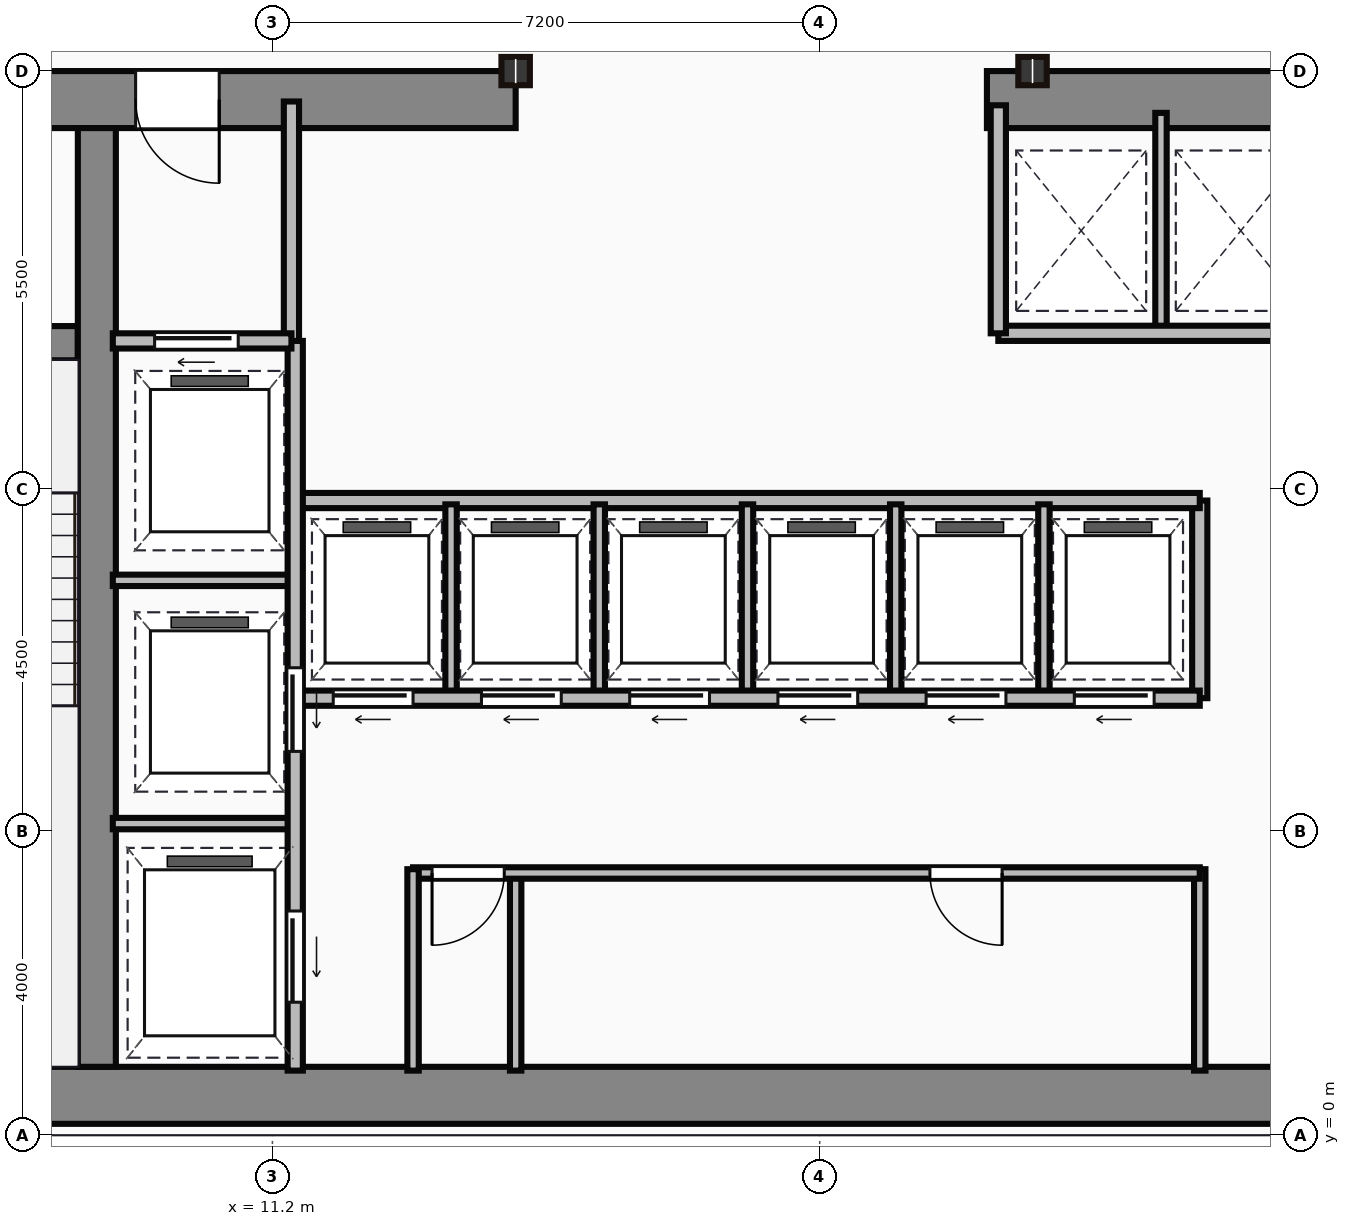
"""IFC4 building model, lengths in metres.
Left out: names, types, materials, properties, quantities, classifications, styles, units other than length and angle.
Written with IfcOpenShell. Run it as: python <this file> out.ifc"""

import sys

from ifc_helpers import new_model, si_unit, direction, frame, frame_2d, origin, origin_2d, place, context, subcontext, project, spatial, rectangle, i_section, extrude, source, transform, mapped, element, fill, save


model = new_model("IFC4")
c1 = context("Model", 3, precision=1e-05, world=origin(), true_north=direction((0.0, 1.0)))
c2 = subcontext(c1, "Body", "Model", "MODEL_VIEW")
j1 = project(units=[si_unit("LENGTHUNIT", "METRE"), si_unit("PLANEANGLEUNIT", "RADIAN")], contexts=[c1])
p1 = place(None, origin())
s1 = spatial("IfcSite", under=j1, at=p1, CompositionType="ELEMENT")
p2 = place(p1, origin())
s2 = spatial("IfcBuilding", under=s1, at=p2, CompositionType="ELEMENT")
p3 = place(p2, frame((0.0, 0.0, 180.75)))
s3 = spatial("IfcBuildingStorey", under=s2, at=p3, CompositionType="ELEMENT", Elevation=180.75)
m1 = source(origin(), c2, "Body", "SweptSolid", [
    extrude(rectangle(XDim=29.5, YDim=0.75, at=frame_2d((14.75, 0.0))), origin(), (0.0, 0.0, 1.0), 3.65),
])
p4 = place(p3, frame((4.5, 0.525, 0.0), z_axis=(0.0, 0.0, 1.0), x_axis=(1.0, 0.0, 0.0)))
e1 = element("IfcWall", 1, at=p4, inside=s3, PredefinedType="SHEAR", context=c2, shape_type="MappedRepresentation", body=[
    mapped(m1, transform((0.0, 0.0, 0.0))),
])
m2 = source(origin(), c2, "Body", "SweptSolid", [
    extrude(rectangle(XDim=9.1, YDim=0.75, at=frame_2d((4.55, 0.0))), origin(), (0.0, 0.0, 1.0), 3.65),
])
p5 = place(p3, frame((5.3, 13.625, 0.0), z_axis=(0.0, 0.0, 1.0), x_axis=(1.0, 0.0, 0.0)))
e2 = element("IfcWall", 2, at=p5, inside=s3, PredefinedType="SHEAR", context=c2, shape_type="MappedRepresentation", body=[
    mapped(m2, transform((0.0, 0.0, 0.0))),
])
p6 = place(p5, frame((4.1, 0.0, 0.0)))
e3 = element("IfcOpeningElement", 3, at=p6, cuts=e2, PredefinedType="OPENING", context=c2, shape_type="SweptSolid", body=[
    extrude(rectangle(XDim=1.1, YDim=2.15, at=frame_2d((0.55, 1.075))), frame((0.0, 0.385, 0.0), z_axis=(0.0, -1.0, 0.0), x_axis=(1.0, 0.0, 0.0)), (0.0, 0.0, 1.0), 0.77),
])
m3 = source(origin(), c2, "Body", "SweptSolid", [
    extrude(rectangle(XDim=12.6, YDim=0.75, at=frame_2d((6.3, 0.0))), origin(), (0.0, 0.0, 1.0), 3.65),
])
p7 = place(p3, frame((20.6, 13.625, 0.0), z_axis=(0.0, 0.0, 1.0), x_axis=(1.0, 0.0, 0.0)))
e4 = element("IfcWall", 4, at=p7, inside=s3, PredefinedType="SHEAR", context=c2, shape_type="MappedRepresentation", body=[
    mapped(m3, transform((0.0, 0.0, 0.0))),
])
p8 = place(p7, frame((9.25, 0.0, 0.0)))
e5 = element("IfcOpeningElement", 5, at=p8, cuts=e4, PredefinedType="OPENING", context=c2, shape_type="SweptSolid", body=[
    extrude(rectangle(XDim=1.1, YDim=2.15, at=frame_2d((0.55, 1.075))), frame((0.0, 0.385, 0.0), z_axis=(0.0, -1.0, 0.0), x_axis=(1.0, 0.0, 0.0)), (0.0, 0.0, 1.0), 0.77),
])
m4 = source(origin(), c2, "Body", "SweptSolid", [
    extrude(rectangle(XDim=12.35, YDim=0.5, at=frame_2d((6.175, 0.0))), origin(), (0.0, 0.0, 1.0), 3.65),
])
p9 = place(p3, frame((8.89, 0.9, 0.0), z_axis=(0.0, 0.0, 1.0), x_axis=(0.0, 1.0, 0.0)))
e6 = element("IfcWall", 6, at=p9, inside=s3, PredefinedType="SHEAR", context=c2, shape_type="MappedRepresentation", body=[
    mapped(m4, transform((0.0, 0.0, 0.0))),
])
m5 = source(origin(), c2, "Body", "SweptSolid", [
    extrude(rectangle(XDim=3.39, YDim=0.45, at=frame_2d((1.695, 0.0))), origin(), (0.0, 0.0, 1.0), 3.65),
])
p10 = place(p3, frame((5.25, 10.42, 0.0), z_axis=(0.0, 0.0, 1.0), x_axis=(1.0, 0.0, 0.0)))
e7 = element("IfcWall", 7, at=p10, inside=s3, PredefinedType="SHEAR", context=c2, shape_type="MappedRepresentation", body=[
    mapped(m5, transform((0.0, 0.0, 0.0))),
])
p11 = place(p10, frame((1.05, 0.0, 0.0)))
e8 = element("IfcOpeningElement", 8, at=p11, cuts=e7, PredefinedType="OPENING", context=c2, shape_type="SweptSolid", body=[
    extrude(rectangle(XDim=1.1, YDim=2.15, at=frame_2d((0.55, 1.075))), frame((0.0, 0.235, 0.0), z_axis=(0.0, -1.0, 0.0), x_axis=(1.0, 0.0, 0.0)), (0.0, 0.0, 1.0), 0.47),
])
m6 = source(origin(), c2, "Body", "SweptSolid", [
    extrude(i_section(OverallWidth=0.374, OverallDepth=0.372, WebThickness=0.016, FlangeThickness=0.026, at=origin_2d()), origin(), (0.0, 0.0, 1.0), 3.65),
])
for number, where, z_axis, x_axis in (
    (9, (14.4, 14.0, 0.0), (0.0, 0.0, 1.0), (1.0, 0.0, 0.0)),
    (10, (21.2, 14.0, 0.0), (0.0, 0.0, 1.0), (1.0, 0.0, 0.0)),
):
    element("IfcColumn", number, at=place(p3, frame(where, z_axis=z_axis, x_axis=x_axis)), inside=s3, PredefinedType="COLUMN", context=c2, shape_type="MappedRepresentation", body=[
        mapped(m6, transform((0.0, 0.0, 0.0))),
    ])
m7 = source(origin(), c2, "Body", "SweptSolid", [
    extrude(rectangle(XDim=3.18, YDim=0.2, at=frame_2d((1.59, 0.0))), origin(), (0.0, 0.0, 1.0), 3.4),
])
p12 = place(p3, frame((11.45, 10.42, 0.0), z_axis=(0.0, 0.0, 1.0), x_axis=(0.0, 1.0, 0.0)))
e11 = element("IfcWall", 11, at=p12, inside=s3, PredefinedType="PARTITIONING", context=c2, shape_type="MappedRepresentation", body=[
    mapped(m7, transform((0.0, 0.0, 0.0))),
])
m8 = source(origin(), c2, "Body", "SweptSolid", [
    extrude(rectangle(XDim=2.35, YDim=0.2, at=frame_2d((1.175, 0.0))), origin(), (0.0, 0.0, 1.0), 3.4),
])
p13 = place(p3, frame((9.1, 10.45, 0.0), z_axis=(0.0, 0.0, 1.0), x_axis=(1.0, 0.0, 0.0)))
e12 = element("IfcWall", 12, at=p13, inside=s3, PredefinedType="PARTITIONING", context=c2, shape_type="MappedRepresentation", body=[
    mapped(m8, transform((0.0, 0.0, 0.0))),
])
p14 = place(p13, frame((0.55, 0.0, 0.0)))
e13 = element("IfcOpeningElement", 13, at=p14, cuts=e12, PredefinedType="OPENING", context=c2, shape_type="SweptSolid", body=[
    extrude(rectangle(XDim=1.1, YDim=2.15, at=frame_2d((0.55, 1.075))), frame((0.0, 0.11, 0.0), z_axis=(0.0, -1.0, 0.0), x_axis=(1.0, 0.0, 0.0)), (0.0, 0.0, 1.0), 0.22),
])
m9 = source(origin(), c2, "Body", "SweptSolid", [
    extrude(rectangle(XDim=9.6, YDim=0.2, at=frame_2d((4.8, 0.0))), origin(), (0.0, 0.0, 1.0), 3.4),
])
p15 = place(p3, frame((11.5, 0.85, 0.0), z_axis=(0.0, 0.0, 1.0), x_axis=(0.0, 1.0, 0.0)))
e14 = element("IfcWall", 14, at=p15, inside=s3, PredefinedType="PARTITIONING", context=c2, shape_type="MappedRepresentation", body=[
    mapped(m9, transform((0.0, 0.0, 0.0))),
])
p16 = place(p15, frame((4.2, 0.0, 0.0)))
e15 = element("IfcOpeningElement", 15, at=p16, cuts=e14, PredefinedType="OPENING", context=c2, shape_type="SweptSolid", body=[
    extrude(rectangle(XDim=1.1, YDim=2.15, at=frame_2d((0.55, 1.075))), frame((0.0, 0.11, 0.0), z_axis=(0.0, -1.0, 0.0), x_axis=(1.0, 0.0, 0.0)), (0.0, 0.0, 1.0), 0.22),
])
p17 = place(p15, frame((0.9, 0.0, 0.0)))
e16 = element("IfcOpeningElement", 16, at=p17, cuts=e14, PredefinedType="OPENING", context=c2, shape_type="SweptSolid", body=[
    extrude(rectangle(XDim=1.2, YDim=2.15, at=frame_2d((0.6, 1.075))), frame((0.0, 0.11, 0.0), z_axis=(0.0, -1.0, 0.0), x_axis=(1.0, 0.0, 0.0)), (0.0, 0.0, 1.0), 0.22),
])
m10 = source(origin(), c2, "Body", "SweptSolid", [
    extrude(rectangle(XDim=2.4, YDim=0.15, at=frame_2d((1.2, 0.0))), origin(), (0.0, 0.0, 1.0), 3.4),
])
for number, where, z_axis, x_axis in (
    (17, (9.1, 4.1, 0.0), (0.0, 0.0, 1.0), (1.0, 0.0, 0.0)),
    (18, (9.1, 7.3, 0.0), (0.0, 0.0, 1.0), (1.0, 0.0, 0.0)),
):
    element("IfcWall", number, at=place(p3, frame(where, z_axis=z_axis, x_axis=x_axis)), inside=s3, PredefinedType="PARTITIONING", context=c2, shape_type="MappedRepresentation", body=[
        mapped(m10, transform((0.0, 0.0, 0.0))),
    ])
m11 = source(origin(), c2, "Body", "SweptSolid", [
    extrude(rectangle(XDim=2.65, YDim=0.15, at=frame_2d((1.325, 0.0))), origin(), (0.0, 0.0, 1.0), 3.4),
])
p18 = place(p3, frame((13.05, 0.85, 0.0), z_axis=(0.0, 0.0, 1.0), x_axis=(0.0, 1.0, 0.0)))
e19 = element("IfcWall", 19, at=p18, inside=s3, PredefinedType="PARTITIONING", context=c2, shape_type="MappedRepresentation", body=[
    mapped(m11, transform((0.0, 0.0, 0.0))),
])
m12 = source(origin(), c2, "Body", "SweptSolid", [
    extrude(rectangle(XDim=10.35, YDim=0.15, at=frame_2d((5.175, 0.0))), origin(), (0.0, 0.0, 1.0), 3.4),
])
p19 = place(p3, frame((13.05, 3.45, 0.0), z_axis=(0.0, 0.0, 1.0), x_axis=(1.0, 0.0, 0.0)))
e20 = element("IfcWall", 20, at=p19, inside=s3, PredefinedType="PARTITIONING", context=c2, shape_type="MappedRepresentation", body=[
    mapped(m12, transform((0.0, 0.0, 0.0))),
])
p20 = place(p19, frame((0.25, 0.0, 0.0)))
e21 = element("IfcOpeningElement", 21, at=p20, cuts=e20, PredefinedType="OPENING", context=c2, shape_type="SweptSolid", body=[
    extrude(rectangle(XDim=0.95, YDim=2.15, at=frame_2d((0.475, 1.075))), frame((0.0, 0.085, 0.0), z_axis=(0.0, -1.0, 0.0), x_axis=(1.0, 0.0, 0.0)), (0.0, 0.0, 1.0), 0.17),
])
p21 = place(p19, frame((6.8, 0.0, 0.0)))
e22 = element("IfcOpeningElement", 22, at=p21, cuts=e20, PredefinedType="OPENING", context=c2, shape_type="SweptSolid", body=[
    extrude(rectangle(XDim=0.95, YDim=2.15, at=frame_2d((0.475, 1.075))), frame((0.0, 0.085, 0.0), z_axis=(0.0, -1.0, 0.0), x_axis=(1.0, 0.0, 0.0)), (0.0, 0.0, 1.0), 0.17),
])
p22 = place(p3, frame((23.4, 0.85, 0.0), z_axis=(0.0, 0.0, 1.0), x_axis=(0.0, 1.0, 0.0)))
e23 = element("IfcWall", 23, at=p22, inside=s3, PredefinedType="PARTITIONING", context=c2, shape_type="MappedRepresentation", body=[
    mapped(m11, transform((0.0, 0.0, 0.0))),
])
m13 = source(origin(), c2, "Body", "SweptSolid", [
    extrude(rectangle(XDim=2.6, YDim=0.15, at=frame_2d((1.3, 0.0))), origin(), (0.0, 0.0, 1.0), 3.4),
])
p23 = place(p3, frame((14.4, 0.85, 0.0), z_axis=(0.0, 0.0, 1.0), x_axis=(0.0, 1.0, 0.0)))
e24 = element("IfcWall", 24, at=p23, inside=s3, PredefinedType="PARTITIONING", context=c2, shape_type="MappedRepresentation", body=[
    mapped(m13, transform((0.0, 0.0, 0.0))),
])
m14 = source(origin(), c2, "Body", "SweptSolid", [
    extrude(rectangle(XDim=11.85, YDim=0.2, at=frame_2d((5.925, 0.0))), origin(), (0.0, 0.0, 1.0), 3.4),
])
p24 = place(p3, frame((11.55, 5.75, 0.0), z_axis=(0.0, 0.0, 1.0), x_axis=(1.0, 0.0, 0.0)))
e25 = element("IfcWall", 25, at=p24, inside=s3, PredefinedType="PARTITIONING", context=c2, shape_type="MappedRepresentation", body=[
    mapped(m14, transform((0.0, 0.0, 0.0))),
])
p25 = place(p24, frame((0.45, 0.0, 0.0)))
e26 = element("IfcOpeningElement", 26, at=p25, cuts=e25, PredefinedType="OPENING", context=c2, shape_type="SweptSolid", body=[
    extrude(rectangle(XDim=1.05, YDim=2.15, at=frame_2d((0.525, 1.075))), frame((0.0, 0.11, 0.0), z_axis=(0.0, -1.0, 0.0), x_axis=(1.0, 0.0, 0.0)), (0.0, 0.0, 1.0), 0.22),
])
p26 = place(p24, frame((2.4, 0.0, 0.0)))
e27 = element("IfcOpeningElement", 27, at=p26, cuts=e25, PredefinedType="OPENING", context=c2, shape_type="SweptSolid", body=[
    extrude(rectangle(XDim=1.05, YDim=2.15, at=frame_2d((0.525, 1.075))), frame((0.0, 0.11, 0.0), z_axis=(0.0, -1.0, 0.0), x_axis=(1.0, 0.0, 0.0)), (0.0, 0.0, 1.0), 0.22),
])
p27 = place(p24, frame((4.35, 0.0, 0.0)))
e28 = element("IfcOpeningElement", 28, at=p27, cuts=e25, PredefinedType="OPENING", context=c2, shape_type="SweptSolid", body=[
    extrude(rectangle(XDim=1.05, YDim=2.15, at=frame_2d((0.525, 1.075))), frame((0.0, 0.11, 0.0), z_axis=(0.0, -1.0, 0.0), x_axis=(1.0, 0.0, 0.0)), (0.0, 0.0, 1.0), 0.22),
])
p28 = place(p24, frame((6.3, 0.0, 0.0)))
e29 = element("IfcOpeningElement", 29, at=p28, cuts=e25, PredefinedType="OPENING", context=c2, shape_type="SweptSolid", body=[
    extrude(rectangle(XDim=1.05, YDim=2.15, at=frame_2d((0.525, 1.075))), frame((0.0, 0.11, 0.0), z_axis=(0.0, -1.0, 0.0), x_axis=(1.0, 0.0, 0.0)), (0.0, 0.0, 1.0), 0.22),
])
p29 = place(p24, frame((8.25, 0.0, 0.0)))
e30 = element("IfcOpeningElement", 30, at=p29, cuts=e25, PredefinedType="OPENING", context=c2, shape_type="SweptSolid", body=[
    extrude(rectangle(XDim=1.05, YDim=2.15, at=frame_2d((0.525, 1.075))), frame((0.0, 0.11, 0.0), z_axis=(0.0, -1.0, 0.0), x_axis=(1.0, 0.0, 0.0)), (0.0, 0.0, 1.0), 0.22),
])
p30 = place(p24, frame((10.2, 0.0, 0.0)))
e31 = element("IfcOpeningElement", 31, at=p30, cuts=e25, PredefinedType="OPENING", context=c2, shape_type="SweptSolid", body=[
    extrude(rectangle(XDim=1.05, YDim=2.15, at=frame_2d((0.525, 1.075))), frame((0.0, 0.11, 0.0), z_axis=(0.0, -1.0, 0.0), x_axis=(1.0, 0.0, 0.0)), (0.0, 0.0, 1.0), 0.22),
])
p31 = place(p3, frame((11.55, 8.35, 0.0), z_axis=(0.0, 0.0, 1.0), x_axis=(1.0, 0.0, 0.0)))
e32 = element("IfcWall", 32, at=p31, inside=s3, PredefinedType="PARTITIONING", context=c2, shape_type="MappedRepresentation", body=[
    mapped(m14, transform((0.0, 0.0, 0.0))),
])
m15 = source(origin(), c2, "Body", "SweptSolid", [
    extrude(rectangle(XDim=2.6, YDim=0.2, at=frame_2d((1.3, 0.0))), origin(), (0.0, 0.0, 1.0), 3.4),
])
p32 = place(p3, frame((23.4, 5.75, 0.0), z_axis=(0.0, 0.0, 1.0), x_axis=(0.0, 1.0, 0.0)))
e33 = element("IfcWall", 33, at=p32, inside=s3, PredefinedType="PARTITIONING", context=c2, shape_type="MappedRepresentation", body=[
    mapped(m15, transform((0.0, 0.0, 0.0))),
])
m16 = source(origin(), c2, "Body", "SweptSolid", [
    extrude(rectangle(XDim=2.5, YDim=0.15, at=frame_2d((1.25, 0.0))), origin(), (0.0, 0.0, 1.0), 3.4),
])
for number, where, z_axis, x_axis in (
    (34, (13.55, 5.8, 0.0), (0.0, 0.0, 1.0), (0.0, 1.0, 0.0)),
    (35, (15.5, 5.8, 0.0), (0.0, 0.0, 1.0), (0.0, 1.0, 0.0)),
    (36, (17.45, 5.8, 0.0), (0.0, 0.0, 1.0), (0.0, 1.0, 0.0)),
    (37, (19.4, 5.8, 0.0), (0.0, 0.0, 1.0), (0.0, 1.0, 0.0)),
    (38, (21.35, 5.8, 0.0), (0.0, 0.0, 1.0), (0.0, 1.0, 0.0)),
):
    element("IfcWall", number, at=place(p3, frame(where, z_axis=z_axis, x_axis=x_axis)), inside=s3, PredefinedType="PARTITIONING", context=c2, shape_type="MappedRepresentation", body=[
        mapped(m16, transform((0.0, 0.0, 0.0))),
    ])
m17 = source(origin(), c2, "Body", "SweptSolid", [
    extrude(rectangle(XDim=8.8, YDim=0.2, at=frame_2d((4.4, 0.0))), origin(), (0.0, 0.0, 1.0), 3.4),
])
p33 = place(p3, frame((20.75, 10.55, 0.0), z_axis=(0.0, 0.0, 1.0), x_axis=(1.0, 0.0, 0.0)))
e39 = element("IfcWall", 39, at=p33, inside=s3, PredefinedType="PARTITIONING", context=c2, shape_type="MappedRepresentation", body=[
    mapped(m17, transform((0.0, 0.0, 0.0))),
])
m18 = source(origin(), c2, "Body", "SweptSolid", [
    extrude(rectangle(XDim=3.0, YDim=0.2, at=frame_2d((1.5, 0.0))), origin(), (0.0, 0.0, 1.0), 3.4),
])
p34 = place(p3, frame((20.75, 10.55, 0.0), z_axis=(0.0, 0.0, 1.0), x_axis=(0.0, 1.0, 0.0)))
e40 = element("IfcWall", 40, at=p34, inside=s3, PredefinedType="PARTITIONING", context=c2, shape_type="MappedRepresentation", body=[
    mapped(m18, transform((0.0, 0.0, 0.0))),
])
m19 = source(origin(), c2, "Body", "SweptSolid", [
    extrude(rectangle(XDim=2.85, YDim=0.15, at=frame_2d((1.425, 0.0))), origin(), (0.0, 0.0, 1.0), 3.4),
])
p35 = place(p3, frame((22.89, 10.6, 0.0), z_axis=(0.0, 0.0, 1.0), x_axis=(0.0, 1.0, 0.0)))
e41 = element("IfcWall", 41, at=p35, inside=s3, PredefinedType="PARTITIONING", context=c2, shape_type="MappedRepresentation", body=[
    mapped(m19, transform((0.0, 0.0, 0.0))),
])
m20 = source(origin(), c2, "Body", "SweptSolid", [
    extrude(rectangle(XDim=1.1, YDim=2.15, at=frame_2d((0.55, 1.075))), frame((0.0, 0.025, 0.0), z_axis=(0.0, -1.0, 0.0), x_axis=(1.0, 0.0, 0.0)), (0.0, 0.0, 1.0), 0.05),
])
p36 = place(p6, origin())
e42 = element("IfcDoor", 42, at=p36, inside=s3, OperationType="SINGLE_SWING_RIGHT", PredefinedType="DOOR", context=c2, shape_type="MappedRepresentation", body=[
    mapped(m20, transform((0.0, 0.0, 0.0))),
])
fill(e3, e42)
p37 = place(p14, origin())
e43 = element("IfcDoor", 43, at=p37, inside=s3, OperationType="SLIDING_TO_LEFT", PredefinedType="DOOR", context=c2, shape_type="MappedRepresentation", body=[
    mapped(m20, transform((0.0, 0.0, 0.0))),
])
fill(e13, e43)
p38 = place(p16, frame((1.1, 0.0, 0.0), z_axis=(0.0, 0.0, 1.0), x_axis=(-1.0, 0.0, 0.0)))
e44 = element("IfcDoor", 44, at=p38, inside=s3, OperationType="SLIDING_TO_LEFT", PredefinedType="DOOR", context=c2, shape_type="MappedRepresentation", body=[
    mapped(m20, transform((0.0, 0.0, 0.0))),
])
fill(e15, e44)
m21 = source(origin(), c2, "Body", "SweptSolid", [
    extrude(rectangle(XDim=1.2, YDim=2.15, at=frame_2d((0.6, 1.075))), frame((0.0, 0.025, 0.0), z_axis=(0.0, -1.0, 0.0), x_axis=(1.0, 0.0, 0.0)), (0.0, 0.0, 1.0), 0.05),
])
p39 = place(p17, frame((1.2, 0.0, 0.0), z_axis=(0.0, 0.0, 1.0), x_axis=(-1.0, 0.0, 0.0)))
e45 = element("IfcDoor", 45, at=p39, inside=s3, OperationType="SLIDING_TO_LEFT", PredefinedType="DOOR", context=c2, shape_type="MappedRepresentation", body=[
    mapped(m21, transform((0.0, 0.0, 0.0))),
])
fill(e16, e45)
m22 = source(origin(), c2, "Body", "SweptSolid", [
    extrude(rectangle(XDim=0.95, YDim=2.15, at=frame_2d((0.475, 1.075))), frame((0.0, 0.025, 0.0), z_axis=(0.0, -1.0, 0.0), x_axis=(1.0, 0.0, 0.0)), (0.0, 0.0, 1.0), 0.05),
])
p40 = place(p20, origin())
e46 = element("IfcDoor", 46, at=p40, inside=s3, OperationType="SINGLE_SWING_LEFT", PredefinedType="DOOR", context=c2, shape_type="MappedRepresentation", body=[
    mapped(m22, transform((0.0, 0.0, 0.0))),
])
fill(e21, e46)
p41 = place(p21, origin())
e47 = element("IfcDoor", 47, at=p41, inside=s3, OperationType="SINGLE_SWING_RIGHT", PredefinedType="DOOR", context=c2, shape_type="MappedRepresentation", body=[
    mapped(m22, transform((0.0, 0.0, 0.0))),
])
fill(e22, e47)
m23 = source(origin(), c2, "Body", "SweptSolid", [
    extrude(rectangle(XDim=1.05, YDim=2.15, at=frame_2d((0.525, 1.075))), frame((0.0, 0.025, 0.0), z_axis=(0.0, -1.0, 0.0), x_axis=(1.0, 0.0, 0.0)), (0.0, 0.0, 1.0), 0.05),
])
p42 = place(p25, frame((1.05, 0.0, 0.0), z_axis=(0.0, 0.0, 1.0), x_axis=(-1.0, 0.0, 0.0)))
e48 = element("IfcDoor", 48, at=p42, inside=s3, OperationType="SLIDING_TO_LEFT", PredefinedType="DOOR", context=c2, shape_type="MappedRepresentation", body=[
    mapped(m23, transform((0.0, 0.0, 0.0))),
])
fill(e26, e48)
p43 = place(p26, frame((1.05, 0.0, 0.0), z_axis=(0.0, 0.0, 1.0), x_axis=(-1.0, 0.0, 0.0)))
e49 = element("IfcDoor", 49, at=p43, inside=s3, OperationType="SLIDING_TO_LEFT", PredefinedType="DOOR", context=c2, shape_type="MappedRepresentation", body=[
    mapped(m23, transform((0.0, 0.0, 0.0))),
])
fill(e27, e49)
p44 = place(p27, frame((1.05, 0.0, 0.0), z_axis=(0.0, 0.0, 1.0), x_axis=(-1.0, 0.0, 0.0)))
e50 = element("IfcDoor", 50, at=p44, inside=s3, OperationType="SLIDING_TO_LEFT", PredefinedType="DOOR", context=c2, shape_type="MappedRepresentation", body=[
    mapped(m23, transform((0.0, 0.0, 0.0))),
])
fill(e28, e50)
p45 = place(p28, frame((1.05, 0.0, 0.0), z_axis=(0.0, 0.0, 1.0), x_axis=(-1.0, 0.0, 0.0)))
e51 = element("IfcDoor", 51, at=p45, inside=s3, OperationType="SLIDING_TO_LEFT", PredefinedType="DOOR", context=c2, shape_type="MappedRepresentation", body=[
    mapped(m23, transform((0.0, 0.0, 0.0))),
])
fill(e29, e51)
p46 = place(p29, frame((1.05, 0.0, 0.0), z_axis=(0.0, 0.0, 1.0), x_axis=(-1.0, 0.0, 0.0)))
e52 = element("IfcDoor", 52, at=p46, inside=s3, OperationType="SLIDING_TO_LEFT", PredefinedType="DOOR", context=c2, shape_type="MappedRepresentation", body=[
    mapped(m23, transform((0.0, 0.0, 0.0))),
])
fill(e30, e52)
p47 = place(p30, frame((1.05, 0.0, 0.0), z_axis=(0.0, 0.0, 1.0), x_axis=(-1.0, 0.0, 0.0)))
e53 = element("IfcDoor", 53, at=p47, inside=s3, OperationType="SLIDING_TO_LEFT", PredefinedType="DOOR", context=c2, shape_type="MappedRepresentation", body=[
    mapped(m23, transform((0.0, 0.0, 0.0))),
])
fill(e31, e53)
save(model, sys.argv[1])
